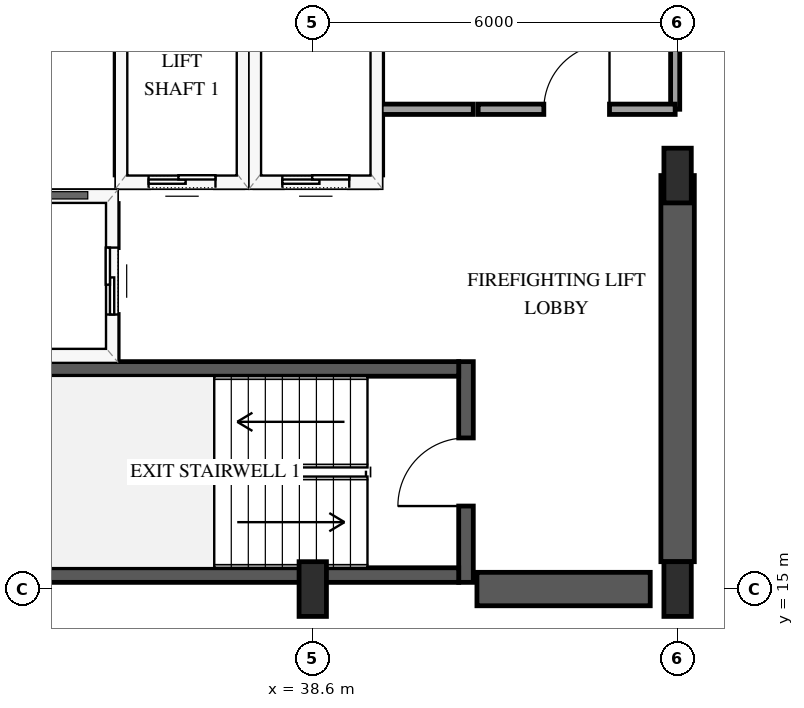
"""IFC4 building model, lengths in metres.
Left out: names, types, materials, properties, quantities, classifications, styles, units other than length and angle.
Written with IfcOpenShell. Run it as: python <this file> out.ifc"""

import sys

from ifc_helpers import new_model, si_unit, direction, frame, frame_2d, origin, origin_2d, place, context, subcontext, project, spatial, rectangle, extrude, element, fill, save


model = new_model("IFC4")
c1 = context("Model", 3, precision=1e-05, world=origin(), true_north=direction((0.0, 1.0)))
c2 = subcontext(c1, "Body", "Model", "MODEL_VIEW")
j1 = project(units=[si_unit("LENGTHUNIT", "METRE"), si_unit("PLANEANGLEUNIT", "RADIAN")], contexts=[c1])
p1 = place(None, origin())
s1 = spatial("IfcSite", under=j1, at=p1, CompositionType="ELEMENT")
p2 = place(p1, origin())
s2 = spatial("IfcBuilding", under=s1, at=p2, CompositionType="ELEMENT")
p3 = place(p2, frame((0.0, 0.0, 157.0)))
s3 = spatial("IfcBuildingStorey", under=s2, at=p3, CompositionType="ELEMENT", Elevation=157.0)
p4 = place(p3, frame((41.12, 15.11, 0.0), z_axis=(0.0, 0.0, 1.0), x_axis=(0.0, 1.0, 0.0)))
e1 = element("IfcWall", 1, at=p4, inside=s3, PredefinedType="SHEAR", context=c2, shape_type="SweptSolid", body=[
    extrude(rectangle(XDim=3.63, YDim=0.24, at=frame_2d((1.815, 0.0))), origin(), (0.0, 0.0, 1.0), 3.6),
])
p5 = place(p4, frame((1.255, 0.0, 0.0)))
e2 = element("IfcOpeningElement", 2, at=p5, cuts=e1, PredefinedType="OPENING", context=c2, shape_type="SweptSolid", body=[
    extrude(rectangle(XDim=1.12, YDim=2.15, at=frame_2d((0.56, 1.075))), frame((0.0, 0.13, 0.0), z_axis=(0.0, -1.0, 0.0), x_axis=(1.0, 0.0, 0.0)), (0.0, 0.0, 1.0), 0.26),
])
for number, where, z_axis, x_axis in (
    (3, (33.0, 15.23, 0.0), (0.0, 0.0, 1.0), (1.0, 0.0, 0.0)),
    (4, (33.0, 18.62, 0.0), (0.0, 0.0, 1.0), (1.0, 0.0, 0.0)),
):
    element("IfcWall", number, at=place(p3, frame(where, z_axis=z_axis, x_axis=x_axis)), inside=s3, PredefinedType="SHEAR", context=c2, shape_type="SweptSolid", body=[
        extrude(rectangle(XDim=8.0, YDim=0.24, at=frame_2d((4.0, 0.0))), origin(), (0.0, 0.0, 1.0), 3.6),
    ])
p6 = place(p3, frame((41.3, 15.0, 0.0), z_axis=(0.0, 0.0, 1.0), x_axis=(1.0, 0.0, 0.0)))
e5 = element("IfcWall", 5, at=p6, inside=s3, PredefinedType="SHEAR", context=c2, shape_type="SweptSolid", body=[
    extrude(rectangle(XDim=2.85, YDim=0.55, at=frame_2d((1.425, 0.0))), origin(), (0.0, 0.0, 1.0), 3.6),
])
p7 = place(p3, frame((44.6, 15.45, 0.0), z_axis=(0.0, 0.0, 1.0), x_axis=(0.0, 1.0, 0.0)))
e6 = element("IfcWall", 6, at=p7, inside=s3, PredefinedType="SHEAR", context=c2, shape_type="SweptSolid", body=[
    extrude(rectangle(XDim=6.35, YDim=0.55, at=frame_2d((3.175, 0.0))), origin(), (0.0, 0.0, 1.0), 3.6),
])
for number, where, z_axis, x_axis in (
    (7, (38.6, 15.0, 0.0), (0.0, 0.0, 1.0), (1.0, 0.0, 0.0)),
    (8, (44.6, 15.0, 0.0), (0.0, 0.0, 1.0), (1.0, 0.0, 0.0)),
    (9, (44.6, 21.8, 0.0), (0.0, 0.0, 1.0), (1.0, 0.0, 0.0)),
):
    element("IfcColumn", number, at=place(p3, frame(where, z_axis=z_axis, x_axis=x_axis)), inside=s3, PredefinedType="PILASTER", context=c2, shape_type="SweptSolid", body=[
        extrude(rectangle(XDim=0.45, YDim=0.9, at=origin_2d()), origin(), (0.0, 0.0, 1.0), 3.6),
    ])
p8 = place(p3, frame((35.45, 21.7, 0.0), z_axis=(0.0, 0.0, 1.0), x_axis=(1.0, 0.0, 0.0)))
e10 = element("IfcWall", 10, at=p8, inside=s3, PredefinedType="SOLIDWALL", context=c2, shape_type="SweptSolid", body=[
    extrude(rectangle(XDim=2.0, YDim=0.2, at=frame_2d((1.0, 0.0))), origin(), (0.0, 0.0, 1.0), 3.3),
])
p9 = place(p8, frame((0.45, 0.0, 0.0)))
e11 = element("IfcOpeningElement", 11, at=p9, cuts=e10, PredefinedType="OPENING", context=c2, shape_type="SweptSolid", body=[
    extrude(rectangle(XDim=1.1, YDim=2.15, at=frame_2d((0.55, 1.075))), frame((0.0, 0.11, 0.0), z_axis=(0.0, -1.0, 0.0), x_axis=(1.0, 0.0, 0.0)), (0.0, 0.0, 1.0), 0.22),
])
for number, where, z_axis, x_axis in (
    (12, (35.45, 21.81, 0.0), (0.0, 0.0, 1.0), (0.0, 1.0, 0.0)),
    (13, (37.45, 21.81, 0.0), (0.0, 0.0, 1.0), (0.0, 1.0, 0.0)),
):
    element("IfcWall", number, at=place(p3, frame(where, z_axis=z_axis, x_axis=x_axis)), inside=s3, PredefinedType="SOLIDWALL", context=c2, shape_type="SweptSolid", body=[
        extrude(rectangle(XDim=2.38, YDim=0.2, at=frame_2d((1.19, 0.0))), origin(), (0.0, 0.0, 1.0), 3.3),
    ])
p10 = place(p3, frame((37.65, 21.7, 0.0), z_axis=(0.0, 0.0, 1.0), x_axis=(1.0, 0.0, 0.0)))
e14 = element("IfcWall", 14, at=p10, inside=s3, PredefinedType="SOLIDWALL", context=c2, shape_type="SweptSolid", body=[
    extrude(rectangle(XDim=2.0, YDim=0.2, at=frame_2d((1.0, 0.0))), origin(), (0.0, 0.0, 1.0), 3.3),
])
p11 = place(p10, frame((0.45, 0.0, 0.0)))
e15 = element("IfcOpeningElement", 15, at=p11, cuts=e14, PredefinedType="OPENING", context=c2, shape_type="SweptSolid", body=[
    extrude(rectangle(XDim=1.1, YDim=2.15, at=frame_2d((0.55, 1.075))), frame((0.0, 0.11, 0.0), z_axis=(0.0, -1.0, 0.0), x_axis=(1.0, 0.0, 0.0)), (0.0, 0.0, 1.0), 0.22),
])
p12 = place(p3, frame((39.65, 21.81, 0.0), z_axis=(0.0, 0.0, 1.0), x_axis=(0.0, 1.0, 0.0)))
e16 = element("IfcWall", 16, at=p12, inside=s3, PredefinedType="SOLIDWALL", context=c2, shape_type="SweptSolid", body=[
    extrude(rectangle(XDim=2.38, YDim=0.2, at=frame_2d((1.19, 0.0))), origin(), (0.0, 0.0, 1.0), 3.3),
])
p13 = place(p3, frame((32.72, 21.45, 0.0), z_axis=(0.0, 0.0, 1.0), x_axis=(1.0, 0.0, 0.0)))
e17 = element("IfcWall", 17, at=p13, inside=s3, PredefinedType="SOLIDWALL", context=c2, shape_type="SweptSolid", body=[
    extrude(rectangle(XDim=2.58, YDim=0.2, at=frame_2d((1.29, 0.0))), origin(), (0.0, 0.0, 1.0), 3.3),
])
p14 = place(p3, frame((35.3, 18.79, 0.0), z_axis=(0.0, 0.0, 1.0), x_axis=(0.0, 1.0, 0.0)))
e18 = element("IfcWall", 18, at=p14, inside=s3, PredefinedType="SOLIDWALL", context=c2, shape_type="SweptSolid", body=[
    extrude(rectangle(XDim=2.55, YDim=0.2, at=frame_2d((1.275, 0.0))), origin(), (0.0, 0.0, 1.0), 3.3),
])
p15 = place(p14, frame((0.725, 0.0, 0.0)))
e19 = element("IfcOpeningElement", 19, at=p15, cuts=e18, PredefinedType="OPENING", context=c2, shape_type="SweptSolid", body=[
    extrude(rectangle(XDim=1.1, YDim=2.15, at=frame_2d((0.55, 1.075))), frame((0.0, 0.11, 0.0), z_axis=(0.0, -1.0, 0.0), x_axis=(1.0, 0.0, 0.0)), (0.0, 0.0, 1.0), 0.22),
])
p16 = place(p3, frame((44.56, 29.8, 0.0), z_axis=(0.0, 0.0, 1.0), x_axis=(0.0, -1.0, 0.0)))
e20 = element("IfcWall", 20, at=p16, inside=s3, PredefinedType="PARTITIONING", context=c2, shape_type="SweptSolid", body=[
    extrude(rectangle(XDim=6.91, YDim=0.15, at=frame_2d((3.455, 0.0))), origin(), (0.0, 0.0, 1.0), 2.34),
])
p17 = place(p16, frame((2.915, 0.0, 0.0)))
e21 = element("IfcOpeningElement", 21, at=p17, cuts=e20, PredefinedType="OPENING", context=c2, shape_type="SweptSolid", body=[
    extrude(rectangle(XDim=1.08, YDim=2.15, at=frame_2d((0.54, 1.075))), frame((0.0, 0.085, 0.0), z_axis=(0.0, -1.0, 0.0), x_axis=(1.0, 0.0, 0.0)), (0.0, 0.0, 1.0), 0.17),
])
p18 = place(p3, frame((41.32, 22.89, 0.0), z_axis=(0.0, 0.0, 1.0), x_axis=(1.0, 0.0, 0.0)))
e22 = element("IfcWall", 22, at=p18, inside=s3, PredefinedType="PARTITIONING", context=c2, shape_type="SweptSolid", body=[
    extrude(rectangle(XDim=3.24, YDim=0.17, at=frame_2d((1.62, 0.0))), origin(), (0.0, 0.0, 1.0), 3.3),
])
p19 = place(p18, frame((1.08, 0.0, 0.0)))
e23 = element("IfcOpeningElement", 23, at=p19, cuts=e22, PredefinedType="OPENING", context=c2, shape_type="SweptSolid", body=[
    extrude(rectangle(XDim=1.08, YDim=2.15, at=frame_2d((0.54, 1.075))), frame((0.0, 0.095, 0.0), z_axis=(0.0, -1.0, 0.0), x_axis=(1.0, 0.0, 0.0)), (0.0, 0.0, 1.0), 0.19),
])
p20 = place(p3, frame((39.72, 22.89, 0.0), z_axis=(0.0, 0.0, 1.0), x_axis=(1.0, 0.0, 0.0)))
e24 = element("IfcWall", 24, at=p20, inside=s3, PredefinedType="PARTITIONING", context=c2, shape_type="SweptSolid", body=[
    extrude(rectangle(XDim=1.52, YDim=0.17, at=frame_2d((0.76, 0.0))), origin(), (0.0, 0.0, 1.0), 3.3),
])
p21 = place(p9, origin())
e25 = element("IfcDoor", 25, at=p21, inside=s3, OperationType="SLIDING_TO_LEFT", PredefinedType="DOOR", context=c2, shape_type="SweptSolid", body=[
    extrude(rectangle(XDim=1.1, YDim=2.15, at=frame_2d((0.55, 1.075))), frame((0.0, 0.025, 0.0), z_axis=(0.0, -1.0, 0.0), x_axis=(1.0, 0.0, 0.0)), (0.0, 0.0, 1.0), 0.05),
])
fill(e11, e25)
p22 = place(p11, origin())
e26 = element("IfcDoor", 26, at=p22, inside=s3, OperationType="SLIDING_TO_LEFT", PredefinedType="DOOR", context=c2, shape_type="SweptSolid", body=[
    extrude(rectangle(XDim=1.1, YDim=2.15, at=frame_2d((0.55, 1.075))), frame((0.0, 0.025, 0.0), z_axis=(0.0, -1.0, 0.0), x_axis=(1.0, 0.0, 0.0)), (0.0, 0.0, 1.0), 0.05),
])
fill(e15, e26)
p23 = place(p15, origin())
e27 = element("IfcDoor", 27, at=p23, inside=s3, OperationType="SLIDING_TO_LEFT", PredefinedType="DOOR", context=c2, shape_type="SweptSolid", body=[
    extrude(rectangle(XDim=1.1, YDim=2.15, at=frame_2d((0.55, 1.075))), frame((0.0, 0.025, 0.0), z_axis=(0.0, -1.0, 0.0), x_axis=(1.0, 0.0, 0.0)), (0.0, 0.0, 1.0), 0.05),
])
fill(e19, e27)
p24 = place(p5, origin())
e28 = element("IfcDoor", 28, at=p24, inside=s3, OperationType="SINGLE_SWING_LEFT", PredefinedType="DOOR", context=c2, shape_type="SweptSolid", body=[
    extrude(rectangle(XDim=1.12, YDim=2.15, at=frame_2d((0.56, 1.075))), frame((0.0, 0.025, 0.0), z_axis=(0.0, -1.0, 0.0), x_axis=(1.0, 0.0, 0.0)), (0.0, 0.0, 1.0), 0.05),
])
fill(e2, e28)
p25 = place(p19, origin())
e29 = element("IfcDoor", 29, at=p25, inside=s3, OperationType="SINGLE_SWING_RIGHT", PredefinedType="DOOR", context=c2, shape_type="SweptSolid", body=[
    extrude(rectangle(XDim=1.08, YDim=2.15, at=frame_2d((0.54, 1.075))), frame((0.0, 0.025, 0.0), z_axis=(0.0, -1.0, 0.0), x_axis=(1.0, 0.0, 0.0)), (0.0, 0.0, 1.0), 0.05),
])
fill(e23, e29)
save(model, sys.argv[1])
